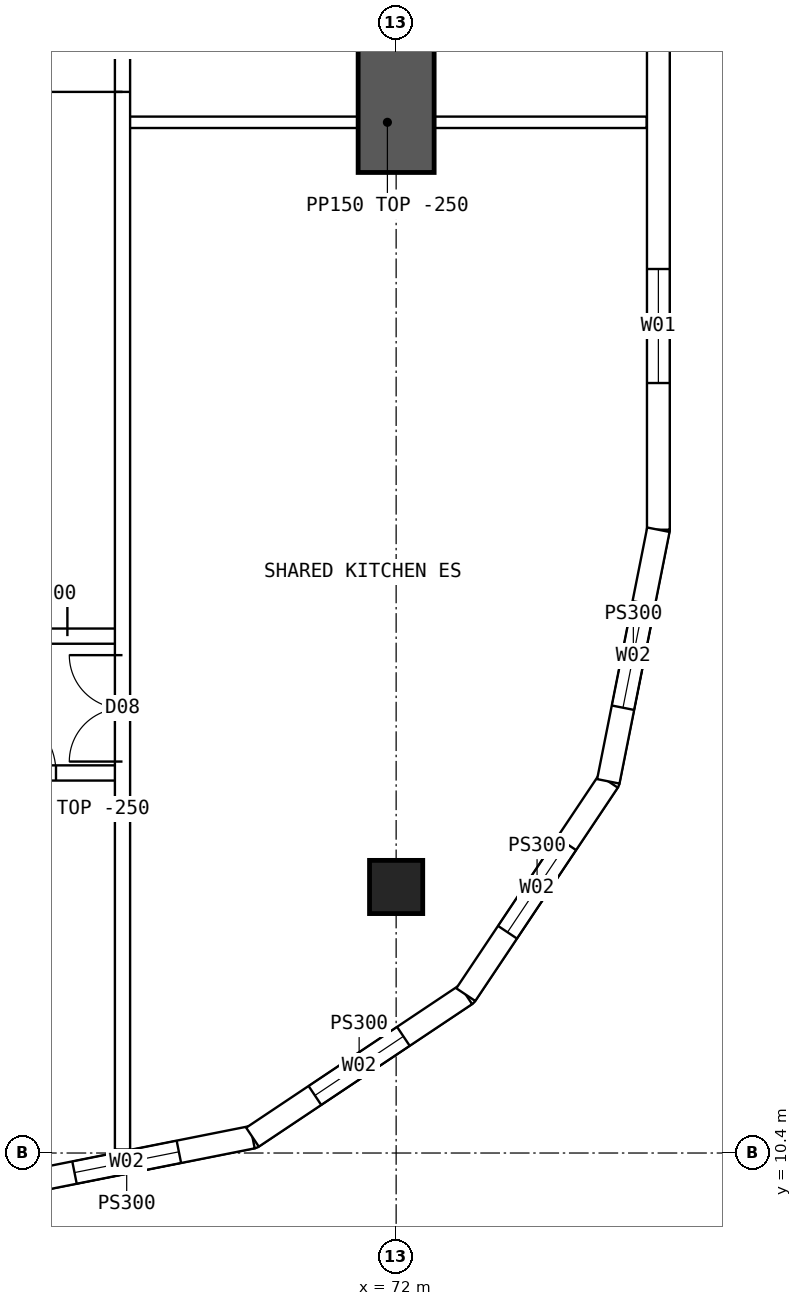
"""IFC4 building model, lengths in metres.
Left out: names, types, materials, properties, quantities, classifications, styles, units other than length and angle.
Written with IfcOpenShell. Run it as: python <this file> out.ifc"""

import sys

from ifc_helpers import new_model, si_unit, direction, frame, frame_2d, origin, origin_2d, place, context, subcontext, project, spatial, polyline, rectangle, hollow_rectangle, outline, extrude, element, fill, save


model = new_model("IFC4")
c1 = context("Model", 3, precision=1e-05, world=origin(), true_north=direction((0.0, 1.0)))
c2 = subcontext(c1, "Body", "Model", "MODEL_VIEW")
j1 = project(units=[si_unit("LENGTHUNIT", "METRE"), si_unit("PLANEANGLEUNIT", "RADIAN")], contexts=[c1])
p1 = place(None, origin())
s1 = spatial("IfcSite", under=j1, at=p1, CompositionType="ELEMENT")
p2 = place(p1, origin())
s2 = spatial("IfcBuilding", under=s1, at=p2, CompositionType="ELEMENT")
p3 = place(p2, frame((0.0, 0.0, 171.1)))
s3 = spatial("IfcBuildingStorey", under=s2, at=p3, CompositionType="ELEMENT", Elevation=171.1)
p4 = place(p3, frame((72.0, 13.9, 0.0), z_axis=(0.0, 0.0, 1.0), x_axis=(1.0, 0.0, 0.0)))
e1 = element("IfcColumn", 1, at=p4, inside=s3, PredefinedType="COLUMN", context=c2, shape_type="SweptSolid", body=[
    extrude(hollow_rectangle(XDim=0.7, YDim=0.7, WallThickness=0.07, at=origin_2d()), origin(), (0.0, 0.0, 1.0), 3.75),
])
p5 = place(p3, frame((72.0, 23.3, 0.0), z_axis=(0.0, 0.0, 1.0), x_axis=(0.0, 1.0, 0.0)))
e2 = element("IfcWall", 2, at=p5, inside=s3, PredefinedType="SHEAR", context=c2, shape_type="SweptSolid", body=[
    extrude(rectangle(XDim=5.0, YDim=1.0, at=frame_2d((2.5, 0.0))), origin(), (0.0, 0.0, 1.0), 3.75),
])
p6 = place(p3, frame((75.45, 18.6, 0.0), z_axis=(0.0, 0.0, 1.0), x_axis=(0.0, 1.0, 0.0)))
e3 = element("IfcWall", 3, at=p6, inside=s3, PredefinedType="SOLIDWALL", context=c2, shape_type="SweptSolid", body=[
    extrude(outline(polyline([(-0.015, -0.15), (26.815, -0.15), (26.785, 0.15), (0.015, 0.15), (-0.015, -0.15)])), origin(), (0.0, 0.0, 1.0), 3.5),
])
p7 = place(p6, frame((1.93, 0.0, 0.9)))
e4 = element("IfcOpeningElement", 4, at=p7, cuts=e3, PredefinedType="OPENING", context=c2, shape_type="SweptSolid", body=[
    extrude(rectangle(XDim=1.5, YDim=2.0, at=frame_2d((0.75, 1.0))), frame((0.0, 0.16, 0.0), z_axis=(0.0, -1.0, 0.0), x_axis=(1.0, 0.0, 0.0)), (0.0, 0.0, 1.0), 0.32),
])
p8 = place(p6, frame((7.29, 0.0, 0.9)))
e5 = element("IfcOpeningElement", 5, at=p8, cuts=e3, PredefinedType="OPENING", context=c2, shape_type="SweptSolid", body=[
    extrude(rectangle(XDim=1.5, YDim=2.0, at=frame_2d((0.75, 1.0))), frame((0.0, 0.16, 0.0), z_axis=(0.0, -1.0, 0.0), x_axis=(1.0, 0.0, 0.0)), (0.0, 0.0, 1.0), 0.32),
])
p9 = place(p6, frame((12.65, 0.0, 0.9)))
e6 = element("IfcOpeningElement", 6, at=p9, cuts=e3, PredefinedType="OPENING", context=c2, shape_type="SweptSolid", body=[
    extrude(rectangle(XDim=1.5, YDim=2.0, at=frame_2d((0.75, 1.0))), frame((0.0, 0.16, 0.0), z_axis=(0.0, -1.0, 0.0), x_axis=(1.0, 0.0, 0.0)), (0.0, 0.0, 1.0), 0.32),
])
p10 = place(p6, frame((18.01, 0.0, 0.9)))
e7 = element("IfcOpeningElement", 7, at=p10, cuts=e3, PredefinedType="OPENING", context=c2, shape_type="SweptSolid", body=[
    extrude(rectangle(XDim=1.5, YDim=2.0, at=frame_2d((0.75, 1.0))), frame((0.0, 0.16, 0.0), z_axis=(0.0, -1.0, 0.0), x_axis=(1.0, 0.0, 0.0)), (0.0, 0.0, 1.0), 0.32),
])
p11 = place(p6, frame((23.37, 0.0, 0.9)))
e8 = element("IfcOpeningElement", 8, at=p11, cuts=e3, PredefinedType="OPENING", context=c2, shape_type="SweptSolid", body=[
    extrude(rectangle(XDim=1.5, YDim=2.0, at=frame_2d((0.75, 1.0))), frame((0.0, 0.16, 0.0), z_axis=(0.0, -1.0, 0.0), x_axis=(1.0, 0.0, 0.0)), (0.0, 0.0, 1.0), 0.32),
])
p12 = place(p3, frame((66.8, 9.95, 0.0), z_axis=(0.0, 0.0, 1.0), x_axis=(0.98078325777, 0.195100490205, 0.0)))
e9 = element("IfcWall", 9, at=p12, inside=s3, PredefinedType="SOLIDWALL", context=c2, shape_type="SweptSolid", body=[
    extrude(outline(polyline([(-0.03, -0.15), (3.405, -0.15), (3.345, 0.15), (0.03, 0.15), (-0.03, -0.15)])), origin(), (0.0, 0.0, 1.0), 3.5),
])
p13 = place(p12, frame((0.988, 0.0, 0.9)))
e10 = element("IfcOpeningElement", 10, at=p13, cuts=e9, PredefinedType="OPENING", context=c2, shape_type="SweptSolid", body=[
    extrude(rectangle(XDim=1.4, YDim=1.8, at=frame_2d((0.7, 0.9))), frame((0.0, 0.16, 0.0), z_axis=(0.0, -1.0, 0.0), x_axis=(1.0, 0.0, 0.0)), (0.0, 0.0, 1.0), 0.32),
])
p14 = place(p3, frame((70.11, 10.608, 0.0), z_axis=(0.0, 0.0, 1.0), x_axis=(0.831493450887, 0.555534554399, 0.0)))
e11 = element("IfcWall", 11, at=p14, inside=s3, PredefinedType="SOLIDWALL", context=c2, shape_type="SweptSolid", body=[
    extrude(outline(polyline([(-0.03, -0.15), (3.405, -0.15), (3.345, 0.15), (0.03, 0.15), (-0.03, -0.15)])), origin(), (0.0, 0.0, 1.0), 3.5),
])
p15 = place(p14, frame((0.988, 0.0, 0.9)))
e12 = element("IfcOpeningElement", 12, at=p15, cuts=e11, PredefinedType="OPENING", context=c2, shape_type="SweptSolid", body=[
    extrude(rectangle(XDim=1.4, YDim=1.8, at=frame_2d((0.7, 0.9))), frame((0.0, 0.16, 0.0), z_axis=(0.0, -1.0, 0.0), x_axis=(1.0, 0.0, 0.0)), (0.0, 0.0, 1.0), 0.32),
])
p16 = place(p3, frame((72.917, 12.483, 0.0), z_axis=(0.0, 0.0, 1.0), x_axis=(0.555534554399, 0.831493450887, 0.0)))
e13 = element("IfcWall", 13, at=p16, inside=s3, PredefinedType="SOLIDWALL", context=c2, shape_type="SweptSolid", body=[
    extrude(outline(polyline([(-0.03, -0.15), (3.405, -0.15), (3.345, 0.15), (0.03, 0.15), (-0.03, -0.15)])), origin(), (0.0, 0.0, 1.0), 3.5),
])
p17 = place(p16, frame((0.988, 0.0, 0.9)))
e14 = element("IfcOpeningElement", 14, at=p17, cuts=e13, PredefinedType="OPENING", context=c2, shape_type="SweptSolid", body=[
    extrude(rectangle(XDim=1.4, YDim=1.8, at=frame_2d((0.7, 0.9))), frame((0.0, 0.16, 0.0), z_axis=(0.0, -1.0, 0.0), x_axis=(1.0, 0.0, 0.0)), (0.0, 0.0, 1.0), 0.32),
])
p18 = place(p3, frame((74.792, 15.29, 0.0), z_axis=(0.0, 0.0, 1.0), x_axis=(0.19508664885, 0.980786011034, 0.0)))
e15 = element("IfcWall", 15, at=p18, inside=s3, PredefinedType="SOLIDWALL", context=c2, shape_type="SweptSolid", body=[
    extrude(outline(polyline([(-0.03, -0.15), (3.39, -0.15), (3.36, 0.15), (0.03, 0.15), (-0.03, -0.15)])), origin(), (0.0, 0.0, 1.0), 3.5),
])
p19 = place(p18, frame((0.988, 0.0, 0.9)))
e16 = element("IfcOpeningElement", 16, at=p19, cuts=e15, PredefinedType="OPENING", context=c2, shape_type="SweptSolid", body=[
    extrude(rectangle(XDim=1.4, YDim=1.8, at=frame_2d((0.7, 0.9))), frame((0.0, 0.16, 0.0), z_axis=(0.0, -1.0, 0.0), x_axis=(1.0, 0.0, 0.0)), (0.0, 0.0, 1.0), 0.32),
])
p20 = place(p3, frame((66.425, 15.4, 0.0), z_axis=(0.0, 0.0, 1.0), x_axis=(1.0, 0.0, 0.0)))
e17 = element("IfcWall", 17, at=p20, inside=s3, PredefinedType="SOLIDWALL", context=c2, shape_type="SweptSolid", body=[
    extrude(rectangle(XDim=1.975, YDim=0.2, at=frame_2d((0.987, 0.0))), origin(), (0.0, 0.0, 1.0), 3.5),
])
p21 = place(p20, frame((0.2, 0.0, 0.0)))
e18 = element("IfcOpeningElement", 18, at=p21, cuts=e17, PredefinedType="OPENING", context=c2, shape_type="SweptSolid", body=[
    extrude(rectangle(XDim=0.9, YDim=2.1, at=frame_2d((0.45, 1.05))), frame((0.0, 0.11, 0.0), z_axis=(0.0, -1.0, 0.0), x_axis=(1.0, 0.0, 0.0)), (0.0, 0.0, 1.0), 0.22),
])
p22 = place(p3, frame((66.425, 17.2, 0.0), z_axis=(0.0, 0.0, 1.0), x_axis=(1.0, 0.0, 0.0)))
e19 = element("IfcWall", 19, at=p22, inside=s3, PredefinedType="SOLIDWALL", context=c2, shape_type="SweptSolid", body=[
    extrude(rectangle(XDim=1.975, YDim=0.2, at=frame_2d((0.987, 0.0))), origin(), (0.0, 0.0, 1.0), 3.5),
])
p23 = place(p22, frame((0.05, 0.0, 0.0)))
e20 = element("IfcOpeningElement", 20, at=p23, cuts=e19, PredefinedType="OPENING", context=c2, shape_type="SweptSolid", body=[
    extrude(rectangle(XDim=1.2, YDim=2.1, at=frame_2d((0.6, 1.05))), frame((0.0, 0.11, 0.0), z_axis=(0.0, -1.0, 0.0), x_axis=(1.0, 0.0, 0.0)), (0.0, 0.0, 1.0), 0.22),
])
p24 = place(p3, frame((68.4, 10.446, 0.0), z_axis=(0.0, 0.0, 1.0), x_axis=(0.0, 1.0, 0.0)))
e21 = element("IfcWall", 21, at=p24, inside=s3, PredefinedType="SOLIDWALL", context=c2, shape_type="SweptSolid", body=[
    extrude(rectangle(XDim=43.107, YDim=0.2, at=frame_2d((21.554, 0.0))), origin(), (0.0, 0.0, 1.0), 3.5),
])
p25 = place(p24, frame((13.914, 0.0, 0.0)))
e22 = element("IfcOpeningElement", 22, at=p25, cuts=e21, PredefinedType="OPENING", context=c2, shape_type="SweptSolid", body=[
    extrude(rectangle(XDim=1.2, YDim=2.1, at=frame_2d((0.6, 1.05))), frame((0.0, 0.11, 0.0), z_axis=(0.0, -1.0, 0.0), x_axis=(1.0, 0.0, 0.0)), (0.0, 0.0, 1.0), 0.22),
])
p26 = place(p24, frame((22.634, 0.0, 0.0)))
e23 = element("IfcOpeningElement", 23, at=p26, cuts=e21, PredefinedType="OPENING", context=c2, shape_type="SweptSolid", body=[
    extrude(rectangle(XDim=1.2, YDim=2.1, at=frame_2d((0.6, 1.05))), frame((0.0, 0.11, 0.0), z_axis=(0.0, -1.0, 0.0), x_axis=(1.0, 0.0, 0.0)), (0.0, 0.0, 1.0), 0.22),
])
p27 = place(p24, frame((5.104, 0.0, 0.0)))
e24 = element("IfcOpeningElement", 24, at=p27, cuts=e21, PredefinedType="OPENING", context=c2, shape_type="SweptSolid", body=[
    extrude(rectangle(XDim=1.4, YDim=2.1, at=frame_2d((0.7, 1.05))), frame((0.0, 0.11, 0.0), z_axis=(0.0, -1.0, 0.0), x_axis=(1.0, 0.0, 0.0)), (0.0, 0.0, 1.0), 0.22),
])
p28 = place(p24, frame((36.504, 0.0, 0.0)))
e25 = element("IfcOpeningElement", 25, at=p28, cuts=e21, PredefinedType="OPENING", context=c2, shape_type="SweptSolid", body=[
    extrude(rectangle(XDim=1.4, YDim=2.1, at=frame_2d((0.7, 1.05))), frame((0.0, 0.11, 0.0), z_axis=(0.0, -1.0, 0.0), x_axis=(1.0, 0.0, 0.0)), (0.0, 0.0, 1.0), 0.22),
])
p29 = place(p3, frame((68.475, 23.96, 0.0), z_axis=(0.0, 0.0, 1.0), x_axis=(1.0, 0.0, 0.0)))
e26 = element("IfcWall", 26, at=p29, inside=s3, PredefinedType="PARTITIONING", context=c2, shape_type="SweptSolid", body=[
    extrude(rectangle(XDim=6.82, YDim=0.15, at=frame_2d((3.41, 0.0))), origin(), (0.0, 0.0, 1.0), 3.5),
])
p30 = place(p7, origin())
e27 = element("IfcWindow", 27, at=p30, inside=s3, PartitioningType="SINGLE_PANEL", PredefinedType="WINDOW", context=c2, shape_type="SweptSolid", body=[
    extrude(rectangle(XDim=1.5, YDim=2.0, at=frame_2d((0.75, 1.0))), frame((0.0, 0.03, 0.0), z_axis=(0.0, -1.0, 0.0), x_axis=(1.0, 0.0, 0.0)), (0.0, 0.0, 1.0), 0.06),
])
fill(e4, e27)
p31 = place(p13, origin())
e28 = element("IfcWindow", 28, at=p31, inside=s3, PartitioningType="SINGLE_PANEL", PredefinedType="WINDOW", context=c2, shape_type="SweptSolid", body=[
    extrude(rectangle(XDim=1.4, YDim=1.8, at=frame_2d((0.7, 0.9))), frame((0.0, 0.03, 0.0), z_axis=(0.0, -1.0, 0.0), x_axis=(1.0, 0.0, 0.0)), (0.0, 0.0, 1.0), 0.06),
])
fill(e10, e28)
p32 = place(p15, origin())
e29 = element("IfcWindow", 29, at=p32, inside=s3, PartitioningType="SINGLE_PANEL", PredefinedType="WINDOW", context=c2, shape_type="SweptSolid", body=[
    extrude(rectangle(XDim=1.4, YDim=1.8, at=frame_2d((0.7, 0.9))), frame((0.0, 0.03, 0.0), z_axis=(0.0, -1.0, 0.0), x_axis=(1.0, 0.0, 0.0)), (0.0, 0.0, 1.0), 0.06),
])
fill(e12, e29)
p33 = place(p17, origin())
e30 = element("IfcWindow", 30, at=p33, inside=s3, PartitioningType="SINGLE_PANEL", PredefinedType="WINDOW", context=c2, shape_type="SweptSolid", body=[
    extrude(rectangle(XDim=1.4, YDim=1.8, at=frame_2d((0.7, 0.9))), frame((0.0, 0.03, 0.0), z_axis=(0.0, -1.0, 0.0), x_axis=(1.0, 0.0, 0.0)), (0.0, 0.0, 1.0), 0.06),
])
fill(e14, e30)
p34 = place(p19, origin())
e31 = element("IfcWindow", 31, at=p34, inside=s3, PartitioningType="SINGLE_PANEL", PredefinedType="WINDOW", context=c2, shape_type="SweptSolid", body=[
    extrude(rectangle(XDim=1.4, YDim=1.8, at=frame_2d((0.7, 0.9))), frame((0.0, 0.03, 0.0), z_axis=(0.0, -1.0, 0.0), x_axis=(1.0, 0.0, 0.0)), (0.0, 0.0, 1.0), 0.06),
])
fill(e16, e31)
p35 = place(p23, origin())
e32 = element("IfcDoor", 32, at=p35, inside=s3, OperationType="DOUBLE_DOOR_SINGLE_SWING", PredefinedType="DOOR", context=c2, shape_type="SweptSolid", body=[
    extrude(rectangle(XDim=1.2, YDim=2.1, at=frame_2d((0.6, 1.05))), frame((0.0, 0.025, 0.0), z_axis=(0.0, -1.0, 0.0), x_axis=(1.0, 0.0, 0.0)), (0.0, 0.0, 1.0), 0.05),
])
fill(e20, e32)
p36 = place(p25, origin())
e33 = element("IfcDoor", 33, at=p36, inside=s3, OperationType="SINGLE_SWING_LEFT", PredefinedType="DOOR", context=c2, shape_type="SweptSolid", body=[
    extrude(rectangle(XDim=1.2, YDim=2.1, at=frame_2d((0.6, 1.05))), frame((0.0, 0.025, 0.0), z_axis=(0.0, -1.0, 0.0), x_axis=(1.0, 0.0, 0.0)), (0.0, 0.0, 1.0), 0.05),
])
fill(e22, e33)
p37 = place(p27, origin())
e34 = element("IfcDoor", 34, at=p37, inside=s3, OperationType="DOUBLE_DOOR_SINGLE_SWING", PredefinedType="DOOR", context=c2, shape_type="SweptSolid", body=[
    extrude(rectangle(XDim=1.4, YDim=2.1, at=frame_2d((0.7, 1.05))), frame((0.0, 0.025, 0.0), z_axis=(0.0, -1.0, 0.0), x_axis=(1.0, 0.0, 0.0)), (0.0, 0.0, 1.0), 0.05),
])
fill(e24, e34)
p38 = place(p21, origin())
e35 = element("IfcDoor", 35, at=p38, inside=s3, OperationType="SINGLE_SWING_LEFT", PredefinedType="DOOR", context=c2, shape_type="SweptSolid", body=[
    extrude(rectangle(XDim=0.9, YDim=2.1, at=frame_2d((0.45, 1.05))), frame((0.0, 0.025, 0.0), z_axis=(0.0, -1.0, 0.0), x_axis=(1.0, 0.0, 0.0)), (0.0, 0.0, 1.0), 0.05),
])
fill(e18, e35)
save(model, sys.argv[1])
